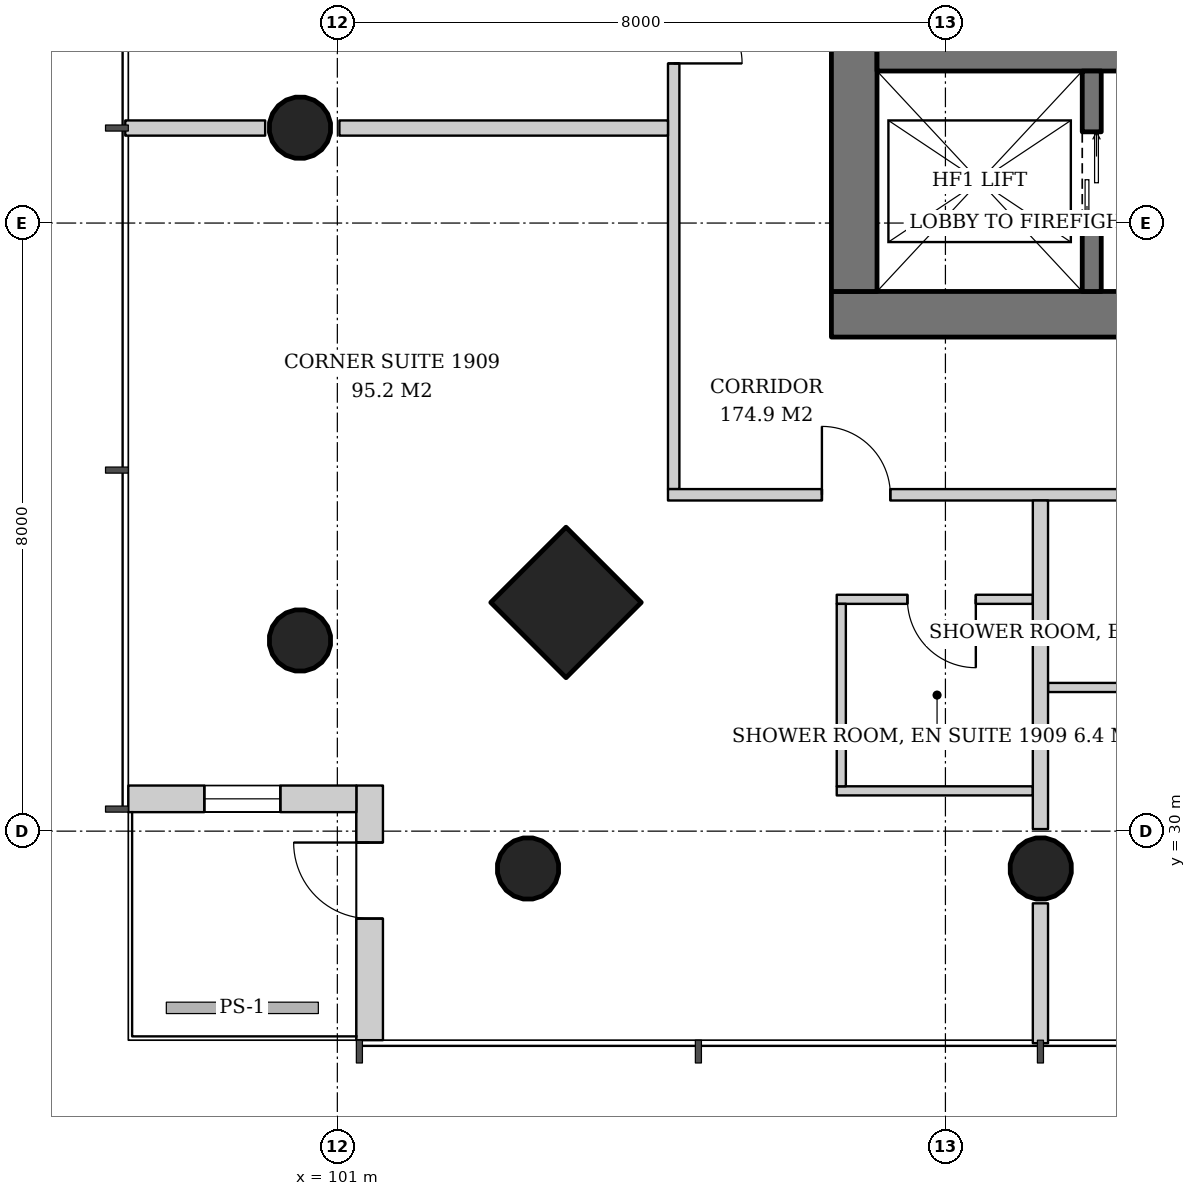
"""IFC4 building model, lengths in metres.
Left out: names, types, materials, properties, quantities, classifications, styles, units other than length and angle.
Written with IfcOpenShell. Run it as: python <this file> out.ifc"""

import sys

from ifc_helpers import new_model, si_unit, direction, frame, frame_2d, origin, origin_2d, place, context, subcontext, project, spatial, rectangle, hollow_circle, extrude, element, fill, save


model = new_model("IFC4")
c1 = context("Model", 3, precision=1e-05, world=origin(), true_north=direction((0.0, 1.0)))
c2 = subcontext(c1, "Body", "Model", "MODEL_VIEW")
j1 = project(units=[si_unit("LENGTHUNIT", "METRE"), si_unit("PLANEANGLEUNIT", "RADIAN")], contexts=[c1])
p1 = place(None, origin())
s1 = spatial("IfcSite", under=j1, at=p1, CompositionType="ELEMENT")
p2 = place(p1, origin())
s2 = spatial("IfcBuilding", under=s1, at=p2, CompositionType="ELEMENT")
p3 = place(p2, frame((0.0, 0.0, 78.0)))
s3 = spatial("IfcBuildingStorey", under=s2, at=p3, CompositionType="ELEMENT", Elevation=78.0)
p4 = place(p3, frame((103.957, 32.957, 0.0), z_axis=(0.043029647111, 0.043029647111, 0.998146732169), x_axis=(-0.707106781187, 0.707106781187, 0.0)))
e1 = element("IfcColumn", 1, at=p4, inside=s3, PredefinedType="COLUMN", context=c2, shape_type="SweptSolid", body=[
    extrude(rectangle(XDim=1.4, YDim=1.4, at=origin_2d()), origin(), (0.0, 0.0, 1.0), 3.807),
])
p5 = place(p3, frame((100.457, 32.457, 0.0), z_axis=(0.043029647111, 0.043029647111, 0.998146732169), x_axis=(-0.707106781187, 0.707106781187, 0.0)))
e2 = element("IfcColumn", 2, at=p5, inside=s3, PredefinedType="COLUMN", context=c2, shape_type="SweptSolid", body=[
    extrude(hollow_circle(Radius=0.406, WallThickness=0.03, at=origin_2d()), origin(), (0.0, 0.0, 1.0), 3.807),
])
p6 = place(p3, frame((100.457, 39.229, 0.0), z_axis=(0.043059584825, 0.021497706284, 0.998841188968), x_axis=(-0.446680166538, 0.894693706707, 0.0)))
e3 = element("IfcColumn", 3, at=p6, inside=s3, PredefinedType="COLUMN", context=c2, shape_type="SweptSolid", body=[
    extrude(hollow_circle(Radius=0.406, WallThickness=0.03, at=origin_2d()), origin(), (0.0, 0.0, 1.0), 3.804),
])
p7 = place(p3, frame((103.457, 29.457, 0.0), z_axis=(0.043029647111, 0.043029647111, 0.998146732169), x_axis=(-0.707106781187, 0.707106781187, 0.0)))
e4 = element("IfcColumn", 4, at=p7, inside=s3, PredefinedType="COLUMN", context=c2, shape_type="SweptSolid", body=[
    extrude(hollow_circle(Radius=0.406, WallThickness=0.03, at=origin_2d()), origin(), (0.0, 0.0, 1.0), 3.807),
])
p8 = place(p3, frame((110.229, 29.457, 0.0), z_axis=(0.021497706284, 0.043059584825, 0.998841188968), x_axis=(-0.894693706707, 0.446680166538, 0.0)))
e5 = element("IfcColumn", 5, at=p8, inside=s3, PredefinedType="COLUMN", context=c2, shape_type="SweptSolid", body=[
    extrude(hollow_circle(Radius=0.406, WallThickness=0.03, at=origin_2d()), origin(), (0.0, 0.0, 1.0), 3.804),
])
p9 = place(p3, frame((107.5, 36.8, 0.0), z_axis=(0.0, 0.0, 1.0), x_axis=(1.0, 0.0, 0.0)))
e6 = element("IfcWall", 6, at=p9, inside=s3, PredefinedType="SHEAR", context=c2, shape_type="SweptSolid", body=[
    extrude(rectangle(XDim=19.0, YDim=0.6, at=frame_2d((9.5, 0.0))), origin(), (0.0, 0.0, 1.0), 3.8),
])
p10 = place(p9, frame((3.9, 0.0, 0.0)))
e7 = element("IfcOpeningElement", 7, at=p10, cuts=e6, PredefinedType="OPENING", context=c2, shape_type="SweptSolid", body=[
    extrude(rectangle(XDim=1.0, YDim=2.1, at=frame_2d((0.5, 1.05))), frame((0.0, 0.31, 0.0), z_axis=(0.0, -1.0, 0.0), x_axis=(1.0, 0.0, 0.0)), (0.0, 0.0, 1.0), 0.62),
])
p11 = place(p9, frame((14.08, 0.0, 0.0)))
e8 = element("IfcOpeningElement", 8, at=p11, cuts=e6, PredefinedType="OPENING", context=c2, shape_type="SweptSolid", body=[
    extrude(rectangle(XDim=1.0, YDim=2.1, at=frame_2d((0.5, 1.05))), frame((0.0, 0.31, 0.0), z_axis=(0.0, -1.0, 0.0), x_axis=(1.0, 0.0, 0.0)), (0.0, 0.0, 1.0), 0.62),
])
p12 = place(p9, frame((15.615, 0.0, 0.0)))
e9 = element("IfcOpeningElement", 9, at=p12, cuts=e6, PredefinedType="OPENING", context=c2, shape_type="SweptSolid", body=[
    extrude(rectangle(XDim=1.0, YDim=2.1, at=frame_2d((0.5, 1.05))), frame((0.0, 0.31, 0.0), z_axis=(0.0, -1.0, 0.0), x_axis=(1.0, 0.0, 0.0)), (0.0, 0.0, 1.0), 0.62),
])
p13 = place(p9, frame((17.188, 0.0, 0.0)))
e10 = element("IfcOpeningElement", 10, at=p13, cuts=e6, PredefinedType="OPENING", context=c2, shape_type="SweptSolid", body=[
    extrude(rectangle(XDim=1.0, YDim=2.1, at=frame_2d((0.5, 1.05))), frame((0.0, 0.31, 0.0), z_axis=(0.0, -1.0, 0.0), x_axis=(1.0, 0.0, 0.0)), (0.0, 0.0, 1.0), 0.62),
])
p14 = place(p3, frame((107.8, 37.1, 0.0), z_axis=(0.0, 0.0, 1.0), x_axis=(0.0, 1.0, 0.0)))
e11 = element("IfcWall", 11, at=p14, inside=s3, PredefinedType="SHEAR", context=c2, shape_type="SweptSolid", body=[
    extrude(rectangle(XDim=17.8, YDim=0.6, at=frame_2d((8.9, 0.0))), origin(), (0.0, 0.0, 1.0), 3.8),
])
p15 = place(p14, frame((8.0, 0.0, 0.0)))
e12 = element("IfcOpeningElement", 12, at=p15, cuts=e11, PredefinedType="OPENING", context=c2, shape_type="SweptSolid", body=[
    extrude(rectangle(XDim=1.8, YDim=2.4, at=frame_2d((0.9, 1.2))), frame((0.0, 0.31, 0.0), z_axis=(0.0, -1.0, 0.0), x_axis=(1.0, 0.0, 0.0)), (0.0, 0.0, 1.0), 0.62),
])
p16 = place(p3, frame((108.1, 40.2, 0.0), z_axis=(0.0, 0.0, 1.0), x_axis=(1.0, 0.0, 0.0)))
e13 = element("IfcWall", 13, at=p16, inside=s3, PredefinedType="SHEAR", context=c2, shape_type="SweptSolid", body=[
    extrude(rectangle(XDim=17.8, YDim=0.4, at=frame_2d((8.9, 0.0))), origin(), (0.0, 0.0, 1.0), 3.8),
])
p17 = place(p3, frame((101.425, 27.25, 0.0), z_axis=(0.0, 0.0, 1.0), x_axis=(0.0, 1.0, 0.0)))
e14 = element("IfcWall", 14, at=p17, inside=s3, PredefinedType="SOLIDWALL", context=c2, shape_type="SweptSolid", body=[
    extrude(rectangle(XDim=3.35, YDim=0.35, at=frame_2d((1.675, 0.0))), origin(), (0.0, 0.0, 1.0), 3.52),
])
p18 = place(p17, frame((1.6, 0.0, 0.0)))
e15 = element("IfcOpeningElement", 15, at=p18, cuts=e14, PredefinedType="OPENING", context=c2, shape_type="SweptSolid", body=[
    extrude(rectangle(XDim=1.0, YDim=2.4, at=frame_2d((0.5, 1.2))), frame((0.0, 0.185, 0.0), z_axis=(0.0, -1.0, 0.0), x_axis=(1.0, 0.0, 0.0)), (0.0, 0.0, 1.0), 0.37),
])
p19 = place(p3, frame((101.25, 30.425, 0.0), z_axis=(0.0, 0.0, 1.0), x_axis=(-1.0, 0.0, 0.0)))
e16 = element("IfcWall", 16, at=p19, inside=s3, PredefinedType="SOLIDWALL", context=c2, shape_type="SweptSolid", body=[
    extrude(rectangle(XDim=3.0, YDim=0.35, at=frame_2d((1.5, 0.0))), origin(), (0.0, 0.0, 1.0), 3.52),
])
p20 = place(p19, frame((1.0, 0.0, 0.82)))
e17 = element("IfcOpeningElement", 17, at=p20, cuts=e16, PredefinedType="OPENING", context=c2, shape_type="SweptSolid", body=[
    extrude(rectangle(XDim=1.0, YDim=2.4, at=frame_2d((0.5, 1.2))), frame((0.0, 0.185, 0.0), z_axis=(0.0, -1.0, 0.0), x_axis=(1.0, 0.0, 0.0)), (0.0, 0.0, 1.0), 0.37),
])
p21 = place(p3, frame((110.925, 37.1, 0.0), z_axis=(0.0, 0.0, 1.0), x_axis=(0.0, 1.0, 0.0)))
e18 = element("IfcWall", 18, at=p21, inside=s3, PredefinedType="SHEAR", context=c2, shape_type="SweptSolid", body=[
    extrude(rectangle(XDim=2.9, YDim=0.25, at=frame_2d((1.45, 0.0))), origin(), (0.0, 0.0, 1.0), 3.8),
])
p22 = place(p21, frame((0.8, 0.0, 0.0)))
e19 = element("IfcOpeningElement", 19, at=p22, cuts=e18, PredefinedType="OPENING", context=c2, shape_type="SweptSolid", body=[
    extrude(rectangle(XDim=1.3, YDim=2.2, at=frame_2d((0.65, 1.1))), frame((0.0, 0.135, 0.0), z_axis=(0.0, -1.0, 0.0), x_axis=(1.0, 0.0, 0.0)), (0.0, 0.0, 1.0), 0.27),
])
p23 = place(p3, frame((105.425, 57.65, 0.0), z_axis=(0.0, 0.0, 1.0), x_axis=(0.0, -1.0, 0.0)))
e20 = element("IfcWall", 20, at=p23, inside=s3, PredefinedType="PARTITIONING", context=c2, shape_type="SweptSolid", body=[
    extrude(rectangle(XDim=23.15, YDim=0.15, at=frame_2d((11.575, 0.0))), origin(), (0.0, 0.0, 1.0), 2.72),
])
p24 = place(p23, frame((2.025, 0.0, 0.0)))
e21 = element("IfcOpeningElement", 21, at=p24, cuts=e20, PredefinedType="OPENING", context=c2, shape_type="SweptSolid", body=[
    extrude(rectangle(XDim=0.9, YDim=2.1, at=frame_2d((0.45, 1.05))), frame((0.0, 0.085, 0.0), z_axis=(0.0, -1.0, 0.0), x_axis=(1.0, 0.0, 0.0)), (0.0, 0.0, 1.0), 0.17),
])
p25 = place(p23, frame((7.6, 0.0, 0.0)))
e22 = element("IfcOpeningElement", 22, at=p25, cuts=e20, PredefinedType="OPENING", context=c2, shape_type="SweptSolid", body=[
    extrude(rectangle(XDim=1.0, YDim=2.1, at=frame_2d((0.5, 1.05))), frame((0.0, 0.085, 0.0), z_axis=(0.0, -1.0, 0.0), x_axis=(1.0, 0.0, 0.0)), (0.0, 0.0, 1.0), 0.17),
])
p26 = place(p23, frame((10.25, 0.0, 0.0)))
e23 = element("IfcOpeningElement", 23, at=p26, cuts=e20, PredefinedType="OPENING", context=c2, shape_type="SweptSolid", body=[
    extrude(rectangle(XDim=0.9, YDim=2.1, at=frame_2d((0.45, 1.05))), frame((0.0, 0.085, 0.0), z_axis=(0.0, -1.0, 0.0), x_axis=(1.0, 0.0, 0.0)), (0.0, 0.0, 1.0), 0.17),
])
p27 = place(p23, frame((16.65, 0.0, 0.0)))
e24 = element("IfcOpeningElement", 24, at=p27, cuts=e20, PredefinedType="OPENING", context=c2, shape_type="SweptSolid", body=[
    extrude(rectangle(XDim=0.9, YDim=2.1, at=frame_2d((0.45, 1.05))), frame((0.0, 0.085, 0.0), z_axis=(0.0, -1.0, 0.0), x_axis=(1.0, 0.0, 0.0)), (0.0, 0.0, 1.0), 0.17),
])
p28 = place(p3, frame((105.35, 39.25, 0.0), z_axis=(0.0, 0.0, 1.0), x_axis=(-1.0, 0.0, 0.0)))
e25 = element("IfcWall", 25, at=p28, inside=s3, PredefinedType="PARTITIONING", context=c2, shape_type="SweptSolid", body=[
    extrude(rectangle(XDim=4.323, YDim=0.2, at=frame_2d((2.162, 0.0))), origin(), (0.0, 0.0, 1.0), 3.52),
])
p29 = place(p3, frame((100.05, 39.25, 0.0), z_axis=(0.0, 0.0, 1.0), x_axis=(-1.0, 0.0, 0.0)))
e26 = element("IfcWall", 26, at=p29, inside=s3, PredefinedType="PARTITIONING", context=c2, shape_type="SweptSolid", body=[
    extrude(rectangle(XDim=1.84, YDim=0.2, at=frame_2d((0.92, 0.0))), origin(), (0.0, 0.0, 1.0), 3.52),
])
p30 = place(p3, frame((110.15, 33.05, 0.0), z_axis=(0.0, 0.0, 1.0), x_axis=(-1.0, 0.0, 0.0)))
e27 = element("IfcWall", 27, at=p30, inside=s3, PredefinedType="PARTITIONING", context=c2, shape_type="SweptSolid", body=[
    extrude(rectangle(XDim=2.58, YDim=0.12, at=frame_2d((1.29, 0.0))), origin(), (0.0, 0.0, 1.0), 2.82),
])
p31 = place(p30, frame((0.75, 0.0, 0.0)))
e28 = element("IfcOpeningElement", 28, at=p31, cuts=e27, PredefinedType="OPENING", context=c2, shape_type="SweptSolid", body=[
    extrude(rectangle(XDim=0.9, YDim=2.1, at=frame_2d((0.45, 1.05))), frame((0.0, 0.07, 0.0), z_axis=(0.0, -1.0, 0.0), x_axis=(1.0, 0.0, 0.0)), (0.0, 0.0, 1.0), 0.14),
])
p32 = place(p3, frame((110.15, 30.53, 0.0), z_axis=(0.0, 0.0, 1.0), x_axis=(-1.0, 0.0, 0.0)))
e29 = element("IfcWall", 29, at=p32, inside=s3, PredefinedType="PARTITIONING", context=c2, shape_type="SweptSolid", body=[
    extrude(rectangle(XDim=2.58, YDim=0.12, at=frame_2d((1.29, 0.0))), origin(), (0.0, 0.0, 1.0), 2.82),
])
p33 = place(p3, frame((107.63, 32.99, 0.0), z_axis=(0.0, 0.0, 1.0), x_axis=(0.0, -1.0, 0.0)))
e30 = element("IfcWall", 30, at=p33, inside=s3, PredefinedType="PARTITIONING", context=c2, shape_type="SweptSolid", body=[
    extrude(rectangle(XDim=2.4, YDim=0.12, at=frame_2d((1.2, 0.0))), origin(), (0.0, 0.0, 1.0), 2.82),
])
p34 = place(p3, frame((110.35, 31.89, 0.0), z_axis=(0.0, 0.0, 1.0), x_axis=(1.0, 0.0, 0.0)))
e31 = element("IfcWall", 31, at=p34, inside=s3, PredefinedType="PARTITIONING", context=c2, shape_type="SweptSolid", body=[
    extrude(rectangle(XDim=2.42, YDim=0.12, at=frame_2d((1.21, 0.0))), origin(), (0.0, 0.0, 1.0), 2.72),
])
p35 = place(p3, frame((105.35, 34.425, 0.0), z_axis=(0.0, 0.0, 1.0), x_axis=(1.0, 0.0, 0.0)))
e32 = element("IfcWall", 32, at=p35, inside=s3, PredefinedType="PARTITIONING", context=c2, shape_type="SweptSolid", body=[
    extrude(rectangle(XDim=23.15, YDim=0.15, at=frame_2d((11.575, 0.0))), origin(), (0.0, 0.0, 1.0), 2.72),
])
p36 = place(p35, frame((2.025, 0.0, 0.0)))
e33 = element("IfcOpeningElement", 33, at=p36, cuts=e32, PredefinedType="OPENING", context=c2, shape_type="SweptSolid", body=[
    extrude(rectangle(XDim=0.9, YDim=2.1, at=frame_2d((0.45, 1.05))), frame((0.0, 0.085, 0.0), z_axis=(0.0, -1.0, 0.0), x_axis=(1.0, 0.0, 0.0)), (0.0, 0.0, 1.0), 0.17),
])
p37 = place(p35, frame((7.65, 0.0, 0.0)))
e34 = element("IfcOpeningElement", 34, at=p37, cuts=e32, PredefinedType="OPENING", context=c2, shape_type="SweptSolid", body=[
    extrude(rectangle(XDim=0.9, YDim=2.1, at=frame_2d((0.45, 1.05))), frame((0.0, 0.085, 0.0), z_axis=(0.0, -1.0, 0.0), x_axis=(1.0, 0.0, 0.0)), (0.0, 0.0, 1.0), 0.17),
])
p38 = place(p35, frame((14.75, 0.0, 0.0)))
e35 = element("IfcOpeningElement", 35, at=p38, cuts=e32, PredefinedType="OPENING", context=c2, shape_type="SweptSolid", body=[
    extrude(rectangle(XDim=0.9, YDim=2.1, at=frame_2d((0.45, 1.05))), frame((0.0, 0.085, 0.0), z_axis=(0.0, -1.0, 0.0), x_axis=(1.0, 0.0, 0.0)), (0.0, 0.0, 1.0), 0.17),
])
p39 = place(p3, frame((110.25, 34.35, 0.0), z_axis=(0.0, 0.0, 1.0), x_axis=(0.0, -1.0, 0.0)))
e36 = element("IfcWall", 36, at=p39, inside=s3, PredefinedType="PARTITIONING", context=c2, shape_type="SweptSolid", body=[
    extrude(rectangle(XDim=4.323, YDim=0.2, at=frame_2d((2.162, 0.0))), origin(), (0.0, 0.0, 1.0), 3.52),
])
p40 = place(p3, frame((110.25, 29.05, 0.0), z_axis=(0.0, 0.0, 1.0), x_axis=(0.0, -1.0, 0.0)))
e37 = element("IfcWall", 37, at=p40, inside=s3, PredefinedType="PARTITIONING", context=c2, shape_type="SweptSolid", body=[
    extrude(rectangle(XDim=1.84, YDim=0.2, at=frame_2d((0.92, 0.0))), origin(), (0.0, 0.0, 1.0), 3.52),
])
p41 = place(p18, origin())
e38 = element("IfcDoor", 38, at=p41, inside=s3, OperationType="SINGLE_SWING_RIGHT", PredefinedType="DOOR", context=c2, shape_type="SweptSolid", body=[
    extrude(rectangle(XDim=1.0, YDim=2.4, at=frame_2d((0.5, 1.2))), frame((0.0, 0.025, 0.0), z_axis=(0.0, -1.0, 0.0), x_axis=(1.0, 0.0, 0.0)), (0.0, 0.0, 1.0), 0.05),
])
fill(e15, e38)
p42 = place(p20, origin())
e39 = element("IfcWindow", 39, at=p42, inside=s3, PartitioningType="SINGLE_PANEL", PredefinedType="WINDOW", context=c2, shape_type="SweptSolid", body=[
    extrude(rectangle(XDim=1.0, YDim=2.4, at=frame_2d((0.5, 1.2))), frame((0.0, 0.03, 0.0), z_axis=(0.0, -1.0, 0.0), x_axis=(1.0, 0.0, 0.0)), (0.0, 0.0, 1.0), 0.06),
])
fill(e17, e39)
p43 = place(p22, origin())
e40 = element("IfcDoor", 40, at=p43, inside=s3, OperationType="DOUBLE_DOOR_SLIDING", PredefinedType="DOOR", context=c2, shape_type="SweptSolid", body=[
    extrude(rectangle(XDim=1.3, YDim=2.2, at=frame_2d((0.65, 1.1))), frame((0.0, 0.025, 0.0), z_axis=(0.0, -1.0, 0.0), x_axis=(1.0, 0.0, 0.0)), (0.0, 0.0, 1.0), 0.05),
])
fill(e19, e40)
p44 = place(p27, origin())
e41 = element("IfcDoor", 41, at=p44, inside=s3, OperationType="SINGLE_SWING_RIGHT", PredefinedType="DOOR", context=c2, shape_type="SweptSolid", body=[
    extrude(rectangle(XDim=0.9, YDim=2.1, at=frame_2d((0.45, 1.05))), frame((0.0, 0.025, 0.0), z_axis=(0.0, -1.0, 0.0), x_axis=(1.0, 0.0, 0.0)), (0.0, 0.0, 1.0), 0.05),
])
fill(e24, e41)
p45 = place(p31, origin())
e42 = element("IfcDoor", 42, at=p45, inside=s3, OperationType="SINGLE_SWING_LEFT", PredefinedType="DOOR", context=c2, shape_type="SweptSolid", body=[
    extrude(rectangle(XDim=0.9, YDim=2.1, at=frame_2d((0.45, 1.05))), frame((0.0, 0.025, 0.0), z_axis=(0.0, -1.0, 0.0), x_axis=(1.0, 0.0, 0.0)), (0.0, 0.0, 1.0), 0.05),
])
fill(e28, e42)
p46 = place(p36, origin())
e43 = element("IfcDoor", 43, at=p46, inside=s3, OperationType="SINGLE_SWING_LEFT", PredefinedType="DOOR", context=c2, shape_type="SweptSolid", body=[
    extrude(rectangle(XDim=0.9, YDim=2.1, at=frame_2d((0.45, 1.05))), frame((0.0, 0.025, 0.0), z_axis=(0.0, -1.0, 0.0), x_axis=(1.0, 0.0, 0.0)), (0.0, 0.0, 1.0), 0.05),
])
fill(e33, e43)
save(model, sys.argv[1])
